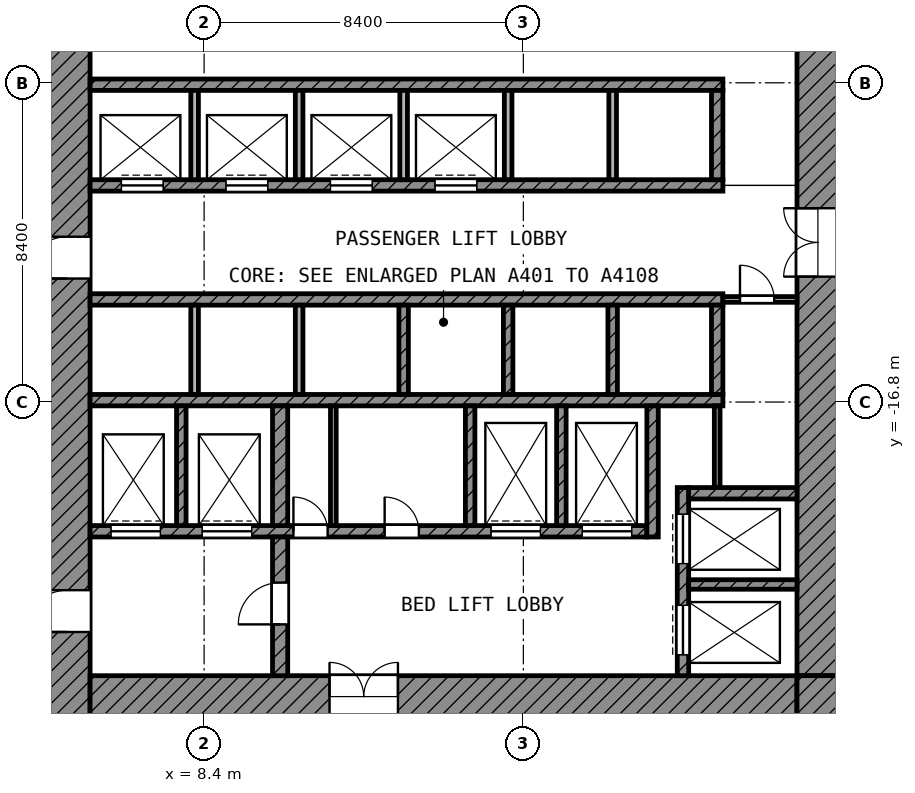
"""IFC4 building model, lengths in metres.
Left out: names, types, materials, properties, quantities, classifications, styles, units other than length and angle.
Written with IfcOpenShell. Run it as: python <this file> out.ifc"""

import sys

from ifc_helpers import new_model, si_unit, direction, frame, frame_2d, origin, place, context, subcontext, project, spatial, rectangle, extrude, element, fill, save


model = new_model("IFC4")
c1 = context("Model", 3, precision=1e-05, world=origin(), true_north=direction((0.0, 1.0)))
c2 = subcontext(c1, "Body", "Model", "MODEL_VIEW")
j1 = project(units=[si_unit("LENGTHUNIT", "METRE"), si_unit("PLANEANGLEUNIT", "RADIAN")], contexts=[c1])
p1 = place(None, origin())
s1 = spatial("IfcSite", under=j1, at=p1, CompositionType="ELEMENT")
p2 = place(p1, origin())
s2 = spatial("IfcBuilding", under=s1, at=p2, CompositionType="ELEMENT")
p3 = place(p2, frame((0.0, 0.0, 43.4)))
s3 = spatial("IfcBuildingStorey", under=s2, at=p3, CompositionType="ELEMENT", Elevation=43.4)
p4 = place(p3, frame((4.8, -25.1, 0.0), z_axis=(0.0, 0.0, 1.0), x_axis=(0.0, 1.0, 0.0)))
e1 = element("IfcWall", 1, at=p4, inside=s3, PredefinedType="SHEAR", context=c2, shape_type="SweptSolid", body=[
    extrude(rectangle(XDim=19.7, YDim=1.2, at=frame_2d((9.85, 0.0))), origin(), (0.0, 0.0, 1.0), 3.9),
])
p5 = place(p4, frame((11.55, 0.0, 0.0)))
e2 = element("IfcOpeningElement", 2, at=p5, cuts=e1, PredefinedType="OPENING", context=c2, shape_type="SweptSolid", body=[
    extrude(rectangle(XDim=1.1, YDim=2.1, at=frame_2d((0.55, 1.05))), frame((0.0, 0.61, 0.0), z_axis=(0.0, -1.0, 0.0), x_axis=(1.0, 0.0, 0.0)), (0.0, 0.0, 1.0), 1.22),
])
p6 = place(p4, frame((2.25, 0.0, 0.0)))
e3 = element("IfcOpeningElement", 3, at=p6, cuts=e1, PredefinedType="OPENING", context=c2, shape_type="SweptSolid", body=[
    extrude(rectangle(XDim=1.1, YDim=2.1, at=frame_2d((0.55, 1.05))), frame((0.0, 0.61, 0.0), z_axis=(0.0, -1.0, 0.0), x_axis=(1.0, 0.0, 0.0)), (0.0, 0.0, 1.0), 1.22),
])
p7 = place(p3, frame((24.55, -24.0, 0.0), z_axis=(0.0, 0.0, 1.0), x_axis=(0.0, 1.0, 0.0)))
e4 = element("IfcWall", 4, at=p7, inside=s3, PredefinedType="SHEAR", context=c2, shape_type="SweptSolid", body=[
    extrude(rectangle(XDim=18.6, YDim=1.1, at=frame_2d((9.3, 0.0))), origin(), (0.0, 0.0, 1.0), 3.9),
])
p8 = place(p7, frame((10.5, 0.0, 0.0)))
e5 = element("IfcOpeningElement", 5, at=p8, cuts=e4, PredefinedType="OPENING", context=c2, shape_type="SweptSolid", body=[
    extrude(rectangle(XDim=1.8, YDim=2.1, at=frame_2d((0.9, 1.05))), frame((0.0, 0.56, 0.0), z_axis=(0.0, -1.0, 0.0), x_axis=(1.0, 0.0, 0.0)), (0.0, 0.0, 1.0), 1.12),
])
p9 = place(p3, frame((5.4, -24.55, 0.0), z_axis=(0.0, 0.0, 1.0), x_axis=(1.0, 0.0, 0.0)))
e6 = element("IfcWall", 6, at=p9, inside=s3, PredefinedType="SHEAR", context=c2, shape_type="SweptSolid", body=[
    extrude(rectangle(XDim=18.6, YDim=1.1, at=frame_2d((9.3, 0.0))), origin(), (0.0, 0.0, 1.0), 3.9),
])
p10 = place(p9, frame((6.3, 0.0, 0.0)))
e7 = element("IfcOpeningElement", 7, at=p10, cuts=e6, PredefinedType="OPENING", context=c2, shape_type="SweptSolid", body=[
    extrude(rectangle(XDim=1.8, YDim=2.1, at=frame_2d((0.9, 1.05))), frame((0.0, 0.56, 0.0), z_axis=(0.0, -1.0, 0.0), x_axis=(1.0, 0.0, 0.0)), (0.0, 0.0, 1.0), 1.12),
])
p11 = place(p3, frame((24.55, -25.1, 0.0), z_axis=(0.0, 0.0, 1.0), x_axis=(0.0, 1.0, 0.0)))
e8 = element("IfcWall", 8, at=p11, inside=s3, PredefinedType="SHEAR", context=c2, shape_type="SweptSolid", body=[
    extrude(rectangle(XDim=1.1, YDim=1.1, at=frame_2d((0.55, 0.0))), origin(), (0.0, 0.0, 1.0), 3.9),
])
p12 = place(p3, frame((5.4, -8.45, 0.0), z_axis=(0.0, 0.0, 1.0), x_axis=(1.0, 0.0, 0.0)))
e9 = element("IfcWall", 9, at=p12, inside=s3, PredefinedType="SHEAR", context=c2, shape_type="SweptSolid", body=[
    extrude(rectangle(XDim=16.65, YDim=0.3, at=frame_2d((8.325, 0.0))), origin(), (0.0, 0.0, 1.0), 3.9),
])
p13 = place(p3, frame((5.4, -11.1, 0.0), z_axis=(0.0, 0.0, 1.0), x_axis=(1.0, 0.0, 0.0)))
e10 = element("IfcWall", 10, at=p13, inside=s3, PredefinedType="SHEAR", context=c2, shape_type="SweptSolid", body=[
    extrude(rectangle(XDim=16.65, YDim=0.3, at=frame_2d((8.325, 0.0))), origin(), (0.0, 0.0, 1.0), 3.9),
])
p14 = place(p13, frame((0.825, 0.0, 0.0)))
e11 = element("IfcOpeningElement", 11, at=p14, cuts=e10, PredefinedType="OPENING", context=c2, shape_type="SweptSolid", body=[
    extrude(rectangle(XDim=1.1, YDim=2.1, at=frame_2d((0.55, 1.05))), frame((0.0, 0.16, 0.0), z_axis=(0.0, -1.0, 0.0), x_axis=(1.0, 0.0, 0.0)), (0.0, 0.0, 1.0), 0.32),
])
p15 = place(p13, frame((3.575, 0.0, 0.0)))
e12 = element("IfcOpeningElement", 12, at=p15, cuts=e10, PredefinedType="OPENING", context=c2, shape_type="SweptSolid", body=[
    extrude(rectangle(XDim=1.1, YDim=2.1, at=frame_2d((0.55, 1.05))), frame((0.0, 0.16, 0.0), z_axis=(0.0, -1.0, 0.0), x_axis=(1.0, 0.0, 0.0)), (0.0, 0.0, 1.0), 0.32),
])
p16 = place(p13, frame((6.325, 0.0, 0.0)))
e13 = element("IfcOpeningElement", 13, at=p16, cuts=e10, PredefinedType="OPENING", context=c2, shape_type="SweptSolid", body=[
    extrude(rectangle(XDim=1.1, YDim=2.1, at=frame_2d((0.55, 1.05))), frame((0.0, 0.16, 0.0), z_axis=(0.0, -1.0, 0.0), x_axis=(1.0, 0.0, 0.0)), (0.0, 0.0, 1.0), 0.32),
])
p17 = place(p13, frame((9.075, 0.0, 0.0)))
e14 = element("IfcOpeningElement", 14, at=p17, cuts=e10, PredefinedType="OPENING", context=c2, shape_type="SweptSolid", body=[
    extrude(rectangle(XDim=1.1, YDim=2.1, at=frame_2d((0.55, 1.05))), frame((0.0, 0.16, 0.0), z_axis=(0.0, -1.0, 0.0), x_axis=(1.0, 0.0, 0.0)), (0.0, 0.0, 1.0), 0.32),
])
for number, where, z_axis, x_axis in (
    (15, (5.4, -14.1, 0.0), (0.0, 0.0, 1.0), (1.0, 0.0, 0.0)),
    (16, (5.4, -16.75, 0.0), (0.0, 0.0, 1.0), (1.0, 0.0, 0.0)),
):
    element("IfcWall", number, at=place(p3, frame(where, z_axis=z_axis, x_axis=x_axis)), inside=s3, PredefinedType="SHEAR", context=c2, shape_type="SweptSolid", body=[
        extrude(rectangle(XDim=16.65, YDim=0.3, at=frame_2d((8.325, 0.0))), origin(), (0.0, 0.0, 1.0), 3.9),
    ])
p18 = place(p3, frame((5.4, -20.2, 0.0), z_axis=(0.0, 0.0, 1.0), x_axis=(1.0, 0.0, 0.0)))
e17 = element("IfcWall", 17, at=p18, inside=s3, PredefinedType="SHEAR", context=c2, shape_type="SweptSolid", body=[
    extrude(rectangle(XDim=14.65, YDim=0.3, at=frame_2d((7.325, 0.0))), origin(), (0.0, 0.0, 1.0), 3.9),
])
p19 = place(p18, frame((10.55, 0.0, 0.0)))
e18 = element("IfcOpeningElement", 18, at=p19, cuts=e17, PredefinedType="OPENING", context=c2, shape_type="SweptSolid", body=[
    extrude(rectangle(XDim=1.3, YDim=2.1, at=frame_2d((0.65, 1.05))), frame((0.0, 0.16, 0.0), z_axis=(0.0, -1.0, 0.0), x_axis=(1.0, 0.0, 0.0)), (0.0, 0.0, 1.0), 0.32),
])
p20 = place(p18, frame((12.95, 0.0, 0.0)))
e19 = element("IfcOpeningElement", 19, at=p20, cuts=e17, PredefinedType="OPENING", context=c2, shape_type="SweptSolid", body=[
    extrude(rectangle(XDim=1.3, YDim=2.1, at=frame_2d((0.65, 1.05))), frame((0.0, 0.16, 0.0), z_axis=(0.0, -1.0, 0.0), x_axis=(1.0, 0.0, 0.0)), (0.0, 0.0, 1.0), 0.32),
])
p21 = place(p18, frame((0.55, 0.0, 0.0)))
e20 = element("IfcOpeningElement", 20, at=p21, cuts=e17, PredefinedType="OPENING", context=c2, shape_type="SweptSolid", body=[
    extrude(rectangle(XDim=1.3, YDim=2.1, at=frame_2d((0.65, 1.05))), frame((0.0, 0.16, 0.0), z_axis=(0.0, -1.0, 0.0), x_axis=(1.0, 0.0, 0.0)), (0.0, 0.0, 1.0), 0.32),
])
p22 = place(p18, frame((2.95, 0.0, 0.0)))
e21 = element("IfcOpeningElement", 21, at=p22, cuts=e17, PredefinedType="OPENING", context=c2, shape_type="SweptSolid", body=[
    extrude(rectangle(XDim=1.3, YDim=2.1, at=frame_2d((0.65, 1.05))), frame((0.0, 0.16, 0.0), z_axis=(0.0, -1.0, 0.0), x_axis=(1.0, 0.0, 0.0)), (0.0, 0.0, 1.0), 0.32),
])
p23 = place(p18, frame((5.35, 0.0, 0.0)))
e22 = element("IfcOpeningElement", 22, at=p23, cuts=e17, PredefinedType="OPENING", context=c2, shape_type="SweptSolid", body=[
    extrude(rectangle(XDim=0.9, YDim=2.1, at=frame_2d((0.45, 1.05))), frame((0.0, 0.16, 0.0), z_axis=(0.0, -1.0, 0.0), x_axis=(1.0, 0.0, 0.0)), (0.0, 0.0, 1.0), 0.32),
])
p24 = place(p18, frame((7.75, 0.0, 0.0)))
e23 = element("IfcOpeningElement", 23, at=p24, cuts=e17, PredefinedType="OPENING", context=c2, shape_type="SweptSolid", body=[
    extrude(rectangle(XDim=0.9, YDim=2.1, at=frame_2d((0.45, 1.05))), frame((0.0, 0.16, 0.0), z_axis=(0.0, -1.0, 0.0), x_axis=(1.0, 0.0, 0.0)), (0.0, 0.0, 1.0), 0.32),
])
p25 = place(p3, frame((10.4, -24.0, 0.0), z_axis=(0.0, 0.0, 1.0), x_axis=(0.0, 1.0, 0.0)))
e24 = element("IfcWall", 24, at=p25, inside=s3, PredefinedType="SHEAR", context=c2, shape_type="SweptSolid", body=[
    extrude(rectangle(XDim=3.65, YDim=0.4, at=frame_2d((1.825, 0.0))), origin(), (0.0, 0.0, 1.0), 3.9),
])
p26 = place(p25, frame((1.35, 0.0, 0.0)))
e25 = element("IfcOpeningElement", 25, at=p26, cuts=e24, PredefinedType="OPENING", context=c2, shape_type="SweptSolid", body=[
    extrude(rectangle(XDim=1.1, YDim=2.1, at=frame_2d((0.55, 1.05))), frame((0.0, 0.21, 0.0), z_axis=(0.0, -1.0, 0.0), x_axis=(1.0, 0.0, 0.0)), (0.0, 0.0, 1.0), 0.42),
])
p27 = place(p3, frame((10.4, -20.05, 0.0), z_axis=(0.0, 0.0, 1.0), x_axis=(0.0, 1.0, 0.0)))
e26 = element("IfcWall", 26, at=p27, inside=s3, PredefinedType="SHEAR", context=c2, shape_type="SweptSolid", body=[
    extrude(rectangle(XDim=3.15, YDim=0.4, at=frame_2d((1.575, 0.0))), origin(), (0.0, 0.0, 1.0), 3.9),
])
p28 = place(p3, frame((20.2, -20.35, 0.0), z_axis=(0.0, 0.0, 1.0), x_axis=(0.0, 1.0, 0.0)))
e27 = element("IfcWall", 27, at=p28, inside=s3, PredefinedType="SHEAR", context=c2, shape_type="SweptSolid", body=[
    extrude(rectangle(XDim=3.45, YDim=0.3, at=frame_2d((1.725, 0.0))), origin(), (0.0, 0.0, 1.0), 3.9),
])
p29 = place(p3, frame((21.9, -10.95, 0.0), z_axis=(0.0, 0.0, 1.0), x_axis=(0.0, 1.0, 0.0)))
e28 = element("IfcWall", 28, at=p29, inside=s3, PredefinedType="SHEAR", context=c2, shape_type="SweptSolid", body=[
    extrude(rectangle(XDim=2.35, YDim=0.3, at=frame_2d((1.175, 0.0))), origin(), (0.0, 0.0, 1.0), 3.9),
])
p30 = place(p3, frame((21.9, -16.6, 0.0), z_axis=(0.0, 0.0, 1.0), x_axis=(0.0, 1.0, 0.0)))
e29 = element("IfcWall", 29, at=p30, inside=s3, PredefinedType="SHEAR", context=c2, shape_type="SweptSolid", body=[
    extrude(rectangle(XDim=2.35, YDim=0.3, at=frame_2d((1.175, 0.0))), origin(), (0.0, 0.0, 1.0), 3.9),
])
p31 = place(p3, frame((21.15, -19.2, 0.0), z_axis=(0.0, 0.0, 1.0), x_axis=(1.0, 0.0, 0.0)))
e30 = element("IfcWall", 30, at=p31, inside=s3, PredefinedType="SHEAR", context=c2, shape_type="SweptSolid", body=[
    extrude(rectangle(XDim=2.85, YDim=0.3, at=frame_2d((1.425, 0.0))), origin(), (0.0, 0.0, 1.0), 3.9),
])
p32 = place(p3, frame((21.0, -24.0, 0.0), z_axis=(0.0, 0.0, 1.0), x_axis=(0.0, 1.0, 0.0)))
e31 = element("IfcWall", 31, at=p32, inside=s3, PredefinedType="SHEAR", context=c2, shape_type="SweptSolid", body=[
    extrude(rectangle(XDim=4.95, YDim=0.3, at=frame_2d((2.475, 0.0))), origin(), (0.0, 0.0, 1.0), 3.9),
])
p33 = place(p32, frame((2.95, 0.0, 0.0)))
e32 = element("IfcOpeningElement", 32, at=p33, cuts=e31, PredefinedType="OPENING", context=c2, shape_type="SweptSolid", body=[
    extrude(rectangle(XDim=1.3, YDim=2.1, at=frame_2d((0.65, 1.05))), frame((0.0, 0.16, 0.0), z_axis=(0.0, -1.0, 0.0), x_axis=(1.0, 0.0, 0.0)), (0.0, 0.0, 1.0), 0.32),
])
p34 = place(p32, frame((0.55, 0.0, 0.0)))
e33 = element("IfcOpeningElement", 33, at=p34, cuts=e31, PredefinedType="OPENING", context=c2, shape_type="SweptSolid", body=[
    extrude(rectangle(XDim=1.3, YDim=2.1, at=frame_2d((0.65, 1.05))), frame((0.0, 0.16, 0.0), z_axis=(0.0, -1.0, 0.0), x_axis=(1.0, 0.0, 0.0)), (0.0, 0.0, 1.0), 0.32),
])
p35 = place(p3, frame((21.15, -21.6, 0.0), z_axis=(0.0, 0.0, 1.0), x_axis=(1.0, 0.0, 0.0)))
e34 = element("IfcWall", 34, at=p35, inside=s3, PredefinedType="SHEAR", context=c2, shape_type="SweptSolid", body=[
    extrude(rectangle(XDim=2.85, YDim=0.25, at=frame_2d((1.425, 0.0))), origin(), (0.0, 0.0, 1.0), 3.9),
])
for number, where, z_axis, x_axis in (
    (35, (7.8, -20.05, 0.0), (0.0, 0.0, 1.0), (0.0, 1.0, 0.0)),
    (36, (15.4, -20.05, 0.0), (0.0, 0.0, 1.0), (0.0, 1.0, 0.0)),
    (37, (17.8, -20.05, 0.0), (0.0, 0.0, 1.0), (0.0, 1.0, 0.0)),
):
    element("IfcWall", number, at=place(p3, frame(where, z_axis=z_axis, x_axis=x_axis)), inside=s3, PredefinedType="SHEAR", context=c2, shape_type="SweptSolid", body=[
        extrude(rectangle(XDim=3.15, YDim=0.25, at=frame_2d((1.575, 0.0))), origin(), (0.0, 0.0, 1.0), 3.9),
    ])
for number, where, z_axis, x_axis in (
    (38, (8.15, -10.95, 0.0), (0.0, 0.0, 1.0), (0.0, 1.0, 0.0)),
    (39, (10.9, -10.95, 0.0), (0.0, 0.0, 1.0), (0.0, 1.0, 0.0)),
    (40, (13.65, -10.95, 0.0), (0.0, 0.0, 1.0), (0.0, 1.0, 0.0)),
    (41, (16.4, -10.95, 0.0), (0.0, 0.0, 1.0), (0.0, 1.0, 0.0)),
    (42, (19.15, -10.95, 0.0), (0.0, 0.0, 1.0), (0.0, 1.0, 0.0)),
):
    element("IfcWall", number, at=place(p3, frame(where, z_axis=z_axis, x_axis=x_axis)), inside=s3, PredefinedType="PARTITIONING", context=c2, shape_type="SweptSolid", body=[
        extrude(rectangle(XDim=2.35, YDim=0.2, at=frame_2d((1.175, 0.0))), origin(), (0.0, 0.0, 1.0), 3.9),
    ])
for number, where, z_axis, x_axis in (
    (43, (8.15, -16.6, 0.0), (0.0, 0.0, 1.0), (0.0, 1.0, 0.0)),
    (44, (10.9, -16.6, 0.0), (0.0, 0.0, 1.0), (0.0, 1.0, 0.0)),
):
    element("IfcWall", number, at=place(p3, frame(where, z_axis=z_axis, x_axis=x_axis)), inside=s3, PredefinedType="PARTITIONING", context=c2, shape_type="SweptSolid", body=[
        extrude(rectangle(XDim=2.35, YDim=0.2, at=frame_2d((1.175, 0.0))), origin(), (0.0, 0.0, 1.0), 3.9),
    ])
for number, where, z_axis, x_axis in (
    (45, (13.65, -16.6, 0.0), (0.0, 0.0, 1.0), (0.0, 1.0, 0.0)),
    (46, (16.4, -16.6, 0.0), (0.0, 0.0, 1.0), (0.0, 1.0, 0.0)),
    (47, (19.15, -16.6, 0.0), (0.0, 0.0, 1.0), (0.0, 1.0, 0.0)),
):
    element("IfcWall", number, at=place(p3, frame(where, z_axis=z_axis, x_axis=x_axis)), inside=s3, PredefinedType="SHEAR", context=c2, shape_type="SweptSolid", body=[
        extrude(rectangle(XDim=2.35, YDim=0.25, at=frame_2d((1.175, 0.0))), origin(), (0.0, 0.0, 1.0), 3.9),
    ])
p36 = place(p3, frame((21.9, -19.05, 0.0), z_axis=(0.0, 0.0, 1.0), x_axis=(0.0, 1.0, 0.0)))
e48 = element("IfcWall", 48, at=p36, inside=s3, PredefinedType="PARTITIONING", context=c2, shape_type="SweptSolid", body=[
    extrude(rectangle(XDim=2.15, YDim=0.15, at=frame_2d((1.075, 0.0))), origin(), (0.0, 0.0, 1.0), 3.9),
])
p37 = place(p3, frame((22.05, -14.1, 0.0), z_axis=(0.0, 0.0, 1.0), x_axis=(1.0, 0.0, 0.0)))
e49 = element("IfcWall", 49, at=p37, inside=s3, PredefinedType="PARTITIONING", context=c2, shape_type="SweptSolid", body=[
    extrude(rectangle(XDim=1.95, YDim=0.15, at=frame_2d((0.975, 0.0))), origin(), (0.0, 0.0, 1.0), 3.9),
])
p38 = place(p37, frame((0.45, 0.0, 0.0)))
e50 = element("IfcOpeningElement", 50, at=p38, cuts=e49, PredefinedType="OPENING", context=c2, shape_type="SweptSolid", body=[
    extrude(rectangle(XDim=0.9, YDim=2.1, at=frame_2d((0.45, 1.05))), frame((0.0, 0.085, 0.0), z_axis=(0.0, -1.0, 0.0), x_axis=(1.0, 0.0, 0.0)), (0.0, 0.0, 1.0), 0.17),
])
p39 = place(p3, frame((11.8, -20.05, 0.0), z_axis=(0.0, 0.0, 1.0), x_axis=(0.0, 1.0, 0.0)))
e51 = element("IfcWall", 51, at=p39, inside=s3, PredefinedType="PARTITIONING", context=c2, shape_type="SweptSolid", body=[
    extrude(rectangle(XDim=3.15, YDim=0.15, at=frame_2d((1.575, 0.0))), origin(), (0.0, 0.0, 1.0), 3.9),
])
p40 = place(p14, origin())
e52 = element("IfcDoor", 52, at=p40, inside=s3, OperationType="DOUBLE_DOOR_SLIDING", PredefinedType="DOOR", context=c2, shape_type="SweptSolid", body=[
    extrude(rectangle(XDim=1.1, YDim=2.1, at=frame_2d((0.55, 1.05))), frame((0.0, 0.025, 0.0), z_axis=(0.0, -1.0, 0.0), x_axis=(1.0, 0.0, 0.0)), (0.0, 0.0, 1.0), 0.05),
])
fill(e11, e52)
p41 = place(p15, origin())
e53 = element("IfcDoor", 53, at=p41, inside=s3, OperationType="DOUBLE_DOOR_SLIDING", PredefinedType="DOOR", context=c2, shape_type="SweptSolid", body=[
    extrude(rectangle(XDim=1.1, YDim=2.1, at=frame_2d((0.55, 1.05))), frame((0.0, 0.025, 0.0), z_axis=(0.0, -1.0, 0.0), x_axis=(1.0, 0.0, 0.0)), (0.0, 0.0, 1.0), 0.05),
])
fill(e12, e53)
p42 = place(p16, origin())
e54 = element("IfcDoor", 54, at=p42, inside=s3, OperationType="DOUBLE_DOOR_SLIDING", PredefinedType="DOOR", context=c2, shape_type="SweptSolid", body=[
    extrude(rectangle(XDim=1.1, YDim=2.1, at=frame_2d((0.55, 1.05))), frame((0.0, 0.025, 0.0), z_axis=(0.0, -1.0, 0.0), x_axis=(1.0, 0.0, 0.0)), (0.0, 0.0, 1.0), 0.05),
])
fill(e13, e54)
p43 = place(p17, origin())
e55 = element("IfcDoor", 55, at=p43, inside=s3, OperationType="DOUBLE_DOOR_SLIDING", PredefinedType="DOOR", context=c2, shape_type="SweptSolid", body=[
    extrude(rectangle(XDim=1.1, YDim=2.1, at=frame_2d((0.55, 1.05))), frame((0.0, 0.025, 0.0), z_axis=(0.0, -1.0, 0.0), x_axis=(1.0, 0.0, 0.0)), (0.0, 0.0, 1.0), 0.05),
])
fill(e14, e55)
p44 = place(p33, origin())
e56 = element("IfcDoor", 56, at=p44, inside=s3, OperationType="DOUBLE_DOOR_SLIDING", PredefinedType="DOOR", context=c2, shape_type="SweptSolid", body=[
    extrude(rectangle(XDim=1.3, YDim=2.1, at=frame_2d((0.65, 1.05))), frame((0.0, 0.025, 0.0), z_axis=(0.0, -1.0, 0.0), x_axis=(1.0, 0.0, 0.0)), (0.0, 0.0, 1.0), 0.05),
])
fill(e32, e56)
p45 = place(p34, origin())
e57 = element("IfcDoor", 57, at=p45, inside=s3, OperationType="DOUBLE_DOOR_SLIDING", PredefinedType="DOOR", context=c2, shape_type="SweptSolid", body=[
    extrude(rectangle(XDim=1.3, YDim=2.1, at=frame_2d((0.65, 1.05))), frame((0.0, 0.025, 0.0), z_axis=(0.0, -1.0, 0.0), x_axis=(1.0, 0.0, 0.0)), (0.0, 0.0, 1.0), 0.05),
])
fill(e33, e57)
p46 = place(p19, origin())
e58 = element("IfcDoor", 58, at=p46, inside=s3, OperationType="DOUBLE_DOOR_SLIDING", PredefinedType="DOOR", context=c2, shape_type="SweptSolid", body=[
    extrude(rectangle(XDim=1.3, YDim=2.1, at=frame_2d((0.65, 1.05))), frame((0.0, 0.025, 0.0), z_axis=(0.0, -1.0, 0.0), x_axis=(1.0, 0.0, 0.0)), (0.0, 0.0, 1.0), 0.05),
])
fill(e18, e58)
p47 = place(p20, origin())
e59 = element("IfcDoor", 59, at=p47, inside=s3, OperationType="DOUBLE_DOOR_SLIDING", PredefinedType="DOOR", context=c2, shape_type="SweptSolid", body=[
    extrude(rectangle(XDim=1.3, YDim=2.1, at=frame_2d((0.65, 1.05))), frame((0.0, 0.025, 0.0), z_axis=(0.0, -1.0, 0.0), x_axis=(1.0, 0.0, 0.0)), (0.0, 0.0, 1.0), 0.05),
])
fill(e19, e59)
p48 = place(p21, origin())
e60 = element("IfcDoor", 60, at=p48, inside=s3, OperationType="DOUBLE_DOOR_SLIDING", PredefinedType="DOOR", context=c2, shape_type="SweptSolid", body=[
    extrude(rectangle(XDim=1.3, YDim=2.1, at=frame_2d((0.65, 1.05))), frame((0.0, 0.025, 0.0), z_axis=(0.0, -1.0, 0.0), x_axis=(1.0, 0.0, 0.0)), (0.0, 0.0, 1.0), 0.05),
])
fill(e20, e60)
p49 = place(p22, origin())
e61 = element("IfcDoor", 61, at=p49, inside=s3, OperationType="DOUBLE_DOOR_SLIDING", PredefinedType="DOOR", context=c2, shape_type="SweptSolid", body=[
    extrude(rectangle(XDim=1.3, YDim=2.1, at=frame_2d((0.65, 1.05))), frame((0.0, 0.025, 0.0), z_axis=(0.0, -1.0, 0.0), x_axis=(1.0, 0.0, 0.0)), (0.0, 0.0, 1.0), 0.05),
])
fill(e21, e61)
p50 = place(p5, origin())
e62 = element("IfcDoor", 62, at=p50, inside=s3, OperationType="SINGLE_SWING_LEFT", PredefinedType="DOOR", context=c2, shape_type="SweptSolid", body=[
    extrude(rectangle(XDim=1.1, YDim=2.1, at=frame_2d((0.55, 1.05))), frame((0.0, 0.025, 0.0), z_axis=(0.0, -1.0, 0.0), x_axis=(1.0, 0.0, 0.0)), (0.0, 0.0, 1.0), 0.05),
])
fill(e2, e62)
p51 = place(p6, origin())
e63 = element("IfcDoor", 63, at=p51, inside=s3, OperationType="SINGLE_SWING_LEFT", PredefinedType="DOOR", context=c2, shape_type="SweptSolid", body=[
    extrude(rectangle(XDim=1.1, YDim=2.1, at=frame_2d((0.55, 1.05))), frame((0.0, 0.025, 0.0), z_axis=(0.0, -1.0, 0.0), x_axis=(1.0, 0.0, 0.0)), (0.0, 0.0, 1.0), 0.05),
])
fill(e3, e63)
p52 = place(p26, origin())
e64 = element("IfcDoor", 64, at=p52, inside=s3, OperationType="SINGLE_SWING_LEFT", PredefinedType="DOOR", context=c2, shape_type="SweptSolid", body=[
    extrude(rectangle(XDim=1.1, YDim=2.1, at=frame_2d((0.55, 1.05))), frame((0.0, 0.025, 0.0), z_axis=(0.0, -1.0, 0.0), x_axis=(1.0, 0.0, 0.0)), (0.0, 0.0, 1.0), 0.05),
])
fill(e25, e64)
p53 = place(p8, origin())
e65 = element("IfcDoor", 65, at=p53, inside=s3, OperationType="DOUBLE_DOOR_SINGLE_SWING", PredefinedType="DOOR", context=c2, shape_type="SweptSolid", body=[
    extrude(rectangle(XDim=1.8, YDim=2.1, at=frame_2d((0.9, 1.05))), frame((0.0, 0.025, 0.0), z_axis=(0.0, -1.0, 0.0), x_axis=(1.0, 0.0, 0.0)), (0.0, 0.0, 1.0), 0.05),
])
fill(e5, e65)
p54 = place(p10, origin())
e66 = element("IfcDoor", 66, at=p54, inside=s3, OperationType="DOUBLE_DOOR_SINGLE_SWING", PredefinedType="DOOR", context=c2, shape_type="SweptSolid", body=[
    extrude(rectangle(XDim=1.8, YDim=2.1, at=frame_2d((0.9, 1.05))), frame((0.0, 0.025, 0.0), z_axis=(0.0, -1.0, 0.0), x_axis=(1.0, 0.0, 0.0)), (0.0, 0.0, 1.0), 0.05),
])
fill(e7, e66)
p55 = place(p38, origin())
e67 = element("IfcDoor", 67, at=p55, inside=s3, OperationType="SINGLE_SWING_LEFT", PredefinedType="DOOR", context=c2, shape_type="SweptSolid", body=[
    extrude(rectangle(XDim=0.9, YDim=2.1, at=frame_2d((0.45, 1.05))), frame((0.0, 0.025, 0.0), z_axis=(0.0, -1.0, 0.0), x_axis=(1.0, 0.0, 0.0)), (0.0, 0.0, 1.0), 0.05),
])
fill(e50, e67)
p56 = place(p23, origin())
e68 = element("IfcDoor", 68, at=p56, inside=s3, OperationType="SINGLE_SWING_LEFT", PredefinedType="DOOR", context=c2, shape_type="SweptSolid", body=[
    extrude(rectangle(XDim=0.9, YDim=2.1, at=frame_2d((0.45, 1.05))), frame((0.0, 0.025, 0.0), z_axis=(0.0, -1.0, 0.0), x_axis=(1.0, 0.0, 0.0)), (0.0, 0.0, 1.0), 0.05),
])
fill(e22, e68)
p57 = place(p24, origin())
e69 = element("IfcDoor", 69, at=p57, inside=s3, OperationType="SINGLE_SWING_LEFT", PredefinedType="DOOR", context=c2, shape_type="SweptSolid", body=[
    extrude(rectangle(XDim=0.9, YDim=2.1, at=frame_2d((0.45, 1.05))), frame((0.0, 0.025, 0.0), z_axis=(0.0, -1.0, 0.0), x_axis=(1.0, 0.0, 0.0)), (0.0, 0.0, 1.0), 0.05),
])
fill(e23, e69)
save(model, sys.argv[1])
